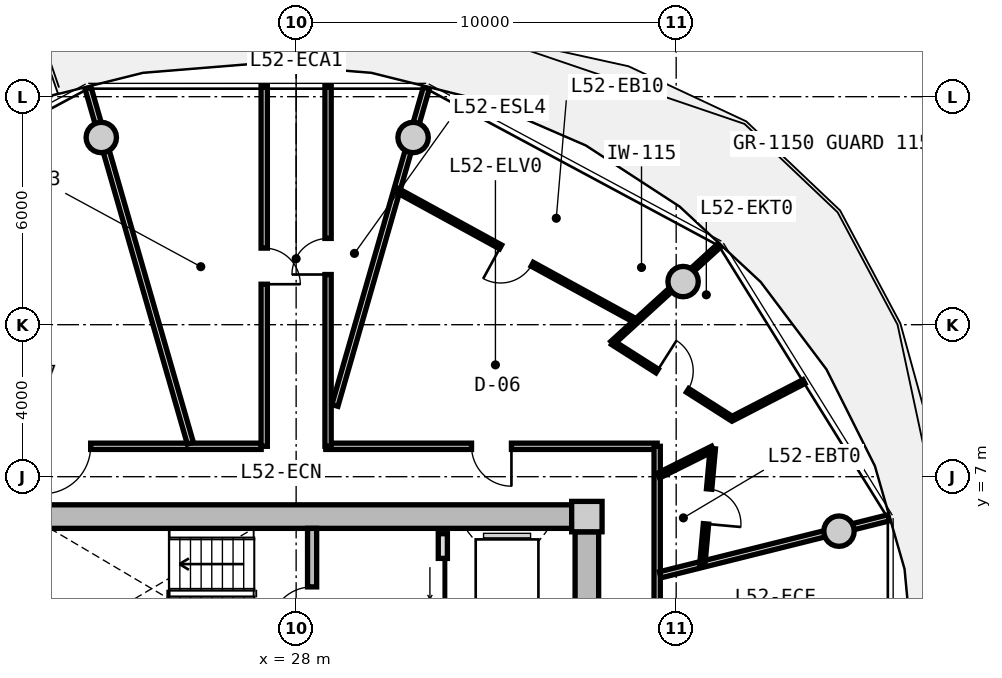
"""IFC4 building model, lengths in metres.
Left out: names, types, materials, properties, quantities, classifications, styles, units other than length and angle.
Written with IfcOpenShell. Run it as: python <this file> out.ifc"""

import sys

from ifc_helpers import new_model, si_unit, direction, frame, frame_2d, origin, origin_2d, place, context, subcontext, project, spatial, rectangle, circle, extrude, source, transform, mapped, element, fill, save


model = new_model("IFC4")
c1 = context("Model", 3, precision=1e-05, world=origin(), true_north=direction((0.0, 1.0)))
c2 = subcontext(c1, "Body", "Model", "MODEL_VIEW")
j1 = project(units=[si_unit("LENGTHUNIT", "METRE"), si_unit("PLANEANGLEUNIT", "RADIAN")], contexts=[c1])
p1 = place(None, origin())
s1 = spatial("IfcSite", under=j1, at=p1, CompositionType="ELEMENT")
p2 = place(p1, origin())
s2 = spatial("IfcBuilding", under=s1, at=p2, CompositionType="ELEMENT")
p3 = place(p2, frame((0.0, 0.0, 167.85)))
s3 = spatial("IfcBuildingStorey", under=s2, at=p3, CompositionType="ELEMENT", Elevation=167.85)
m1 = source(origin(), c2, "Body", "SweptSolid", [
    extrude(rectangle(XDim=0.8, YDim=0.8, at=origin_2d()), origin(), (0.0, 0.0, 1.0), 3.05),
])
p4 = place(p3, frame((35.65, 5.95, 0.0), z_axis=(0.0, 0.0, 1.0), x_axis=(1.0, 0.0, 0.0)))
e1 = element("IfcColumn", 1, at=p4, inside=s3, PredefinedType="COLUMN", context=c2, shape_type="MappedRepresentation", body=[
    mapped(m1, transform((0.0, 0.0, 0.0), x_axis=(1.0, 0.0, 0.0), y_axis=(0.0, 1.0, 0.0), z_axis=(0.0, 0.0, 1.0), scale=1.0)),
])
m2 = source(origin(), c2, "Body", "SweptSolid", [
    extrude(rectangle(XDim=14.5, YDim=0.62, at=frame_2d((7.25, 0.0))), origin(), (0.0, 0.0, 1.0), 2.81),
])
p5 = place(p3, frame((20.75, 5.95, 0.0), z_axis=(0.0, 0.0, 1.0), x_axis=(1.0, 0.0, 0.0)))
e2 = element("IfcWall", 2, at=p5, inside=s3, PredefinedType="SHEAR", context=c2, shape_type="MappedRepresentation", body=[
    mapped(m2, transform((0.0, 0.0, 0.0), x_axis=(1.0, 0.0, 0.0), y_axis=(0.0, 1.0, 0.0), z_axis=(0.0, 0.0, 1.0), scale=1.0)),
])
m3 = source(origin(), c2, "Body", "SweptSolid", [
    extrude(rectangle(XDim=11.1, YDim=0.62, at=frame_2d((5.55, 0.0))), origin(), (0.0, 0.0, 1.0), 2.81),
])
p6 = place(p3, frame((35.65, 5.55, 0.0), z_axis=(0.0, 0.0, 1.0), x_axis=(0.0, -1.0, 0.0)))
e3 = element("IfcWall", 3, at=p6, inside=s3, PredefinedType="SHEAR", context=c2, shape_type="MappedRepresentation", body=[
    mapped(m3, transform((0.0, 0.0, 0.0), x_axis=(1.0, 0.0, 0.0), y_axis=(0.0, 1.0, 0.0), z_axis=(0.0, 0.0, 1.0), scale=1.0)),
])
p7 = place(p6, frame((5.65, 0.0, 0.0)))
e4 = element("IfcOpeningElement", 4, at=p7, cuts=e3, PredefinedType="OPENING", context=c2, shape_type="SweptSolid", body=[
    extrude(rectangle(XDim=1.2, YDim=2.15, at=frame_2d((0.6, 1.075))), frame((0.0, 0.32, 0.0), z_axis=(0.0, -1.0, 0.0), x_axis=(1.0, 0.0, 0.0)), (0.0, 0.0, 1.0), 0.64),
])
p8 = place(p6, frame((9.3, 0.0, 0.0)))
e5 = element("IfcOpeningElement", 5, at=p8, cuts=e3, PredefinedType="OPENING", context=c2, shape_type="SweptSolid", body=[
    extrude(rectangle(XDim=1.0, YDim=2.1, at=frame_2d((0.5, 1.05))), frame((0.0, 0.32, 0.0), z_axis=(0.0, -1.0, 0.0), x_axis=(1.0, 0.0, 0.0)), (0.0, 0.0, 1.0), 0.64),
])
m4 = source(origin(), c2, "Body", "SweptSolid", [
    extrude(circle(Radius=0.4, at=origin_2d()), origin(), (0.0, 0.0, 1.0), 3.05),
])
for number, where, z_axis, x_axis in (
    (6, (42.285, 5.567, 0.0), (0.0, 0.0, 1.0), (1.0, 0.0, 0.0)),
    (7, (38.183, 12.135, 0.0), (0.0, 0.0, 1.0), (1.0, 0.0, 0.0)),
    (8, (31.077, 15.926, 0.0), (0.0, 0.0, 1.0), (1.0, 0.0, 0.0)),
    (9, (22.873, 15.926, 0.0), (0.0, 0.0, 1.0), (1.0, 0.0, 0.0)),
):
    element("IfcColumn", number, at=place(p3, frame(where, z_axis=z_axis, x_axis=x_axis)), inside=s3, PredefinedType="COLUMN", context=c2, shape_type="MappedRepresentation", body=[
        mapped(m4, transform((0.0, 0.0, 0.0), x_axis=(1.0, 0.0, 0.0), y_axis=(0.0, 1.0, 0.0), z_axis=(0.0, 0.0, 1.0), scale=1.0)),
    ])
m5 = source(origin(), c2, "Body", "SweptSolid", [
    extrude(rectangle(XDim=3.19, YDim=0.24, at=frame_2d((1.595, 0.0))), origin(), (0.0, 0.0, 1.0), 2.81),
])
p9 = place(p3, frame((28.42, 2.45, 0.0), z_axis=(0.0, 0.0, 1.0), x_axis=(0.0, 1.0, 0.0)))
e10 = element("IfcWall", 10, at=p9, inside=s3, PredefinedType="PARTITIONING", context=c2, shape_type="MappedRepresentation", body=[
    mapped(m5, transform((0.0, 0.0, 0.0), x_axis=(1.0, 0.0, 0.0), y_axis=(0.0, 1.0, 0.0), z_axis=(0.0, 0.0, 1.0), scale=1.0)),
])
p10 = place(p9, frame((0.55, 0.0, 0.0)))
e11 = element("IfcOpeningElement", 11, at=p10, cuts=e10, PredefinedType="OPENING", context=c2, shape_type="SweptSolid", body=[
    extrude(rectangle(XDim=1.1, YDim=2.15, at=frame_2d((0.55, 1.075))), frame((0.0, 0.13, 0.0), z_axis=(0.0, -1.0, 0.0), x_axis=(1.0, 0.0, 0.0)), (0.0, 0.0, 1.0), 0.26),
])
m6 = source(origin(), c2, "Body", "SweptSolid", [
    extrude(rectangle(XDim=5.0, YDim=0.24, at=frame_2d((2.5, 0.0))), origin(), (0.0, 0.0, 1.0), 2.795),
])
p11 = place(p3, frame((31.86, 0.5, 0.0), z_axis=(0.0, 0.0, 1.0), x_axis=(0.0, 1.0, 0.0)))
e12 = element("IfcWall", 12, at=p11, inside=s3, PredefinedType="PARTITIONING", context=c2, shape_type="MappedRepresentation", body=[
    mapped(m6, transform((0.0, 0.0, 0.0), x_axis=(1.0, 0.0, 0.0), y_axis=(0.0, 1.0, 0.0), z_axis=(0.0, 0.0, 1.0), scale=1.0)),
])
p12 = place(p11, frame((3.05, 0.0, 0.0)))
e13 = element("IfcOpeningElement", 13, at=p12, cuts=e12, PredefinedType="OPENING", context=c2, shape_type="SweptSolid", body=[
    extrude(rectangle(XDim=1.3, YDim=2.2, at=frame_2d((0.65, 1.1))), frame((0.0, 0.13, 0.0), z_axis=(0.0, -1.0, 0.0), x_axis=(1.0, 0.0, 0.0)), (0.0, 0.0, 1.0), 0.26),
])
p13 = place(p11, frame((0.55, 0.0, 0.0)))
e14 = element("IfcOpeningElement", 14, at=p13, cuts=e12, PredefinedType="OPENING", context=c2, shape_type="SweptSolid", body=[
    extrude(rectangle(XDim=1.3, YDim=2.2, at=frame_2d((0.65, 1.1))), frame((0.0, 0.13, 0.0), z_axis=(0.0, -1.0, 0.0), x_axis=(1.0, 0.0, 0.0)), (0.0, 0.0, 1.0), 0.26),
])
m7 = source(origin(), c2, "Body", "SweptSolid", [
    extrude(rectangle(XDim=8.58, YDim=0.165, at=frame_2d((4.29, 0.0))), origin(), (0.0, 0.0, 1.0), 2.795),
])
p14 = place(p3, frame((18.5, 7.8, 0.0), z_axis=(0.0, 0.0, 1.0), x_axis=(1.0, 0.0, 0.0)))
e15 = element("IfcWall", 15, at=p14, inside=s3, PredefinedType="PARTITIONING", context=c2, shape_type="MappedRepresentation", body=[
    mapped(m7, transform((0.0, 0.0, 0.0), x_axis=(1.0, 0.0, 0.0), y_axis=(0.0, 1.0, 0.0), z_axis=(0.0, 0.0, 1.0), scale=1.0)),
])
p15 = place(p14, frame((2.843, 0.0, 0.0)))
e16 = element("IfcOpeningElement", 16, at=p15, cuts=e15, PredefinedType="OPENING", context=c2, shape_type="SweptSolid", body=[
    extrude(rectangle(XDim=1.25, YDim=2.2, at=frame_2d((0.625, 1.1))), frame((0.0, 0.093, 0.0), z_axis=(0.0, -1.0, 0.0), x_axis=(1.0, 0.0, 0.0)), (0.0, 0.0, 1.0), 0.185),
])
m8 = source(origin(), c2, "Body", "SweptSolid", [
    extrude(rectangle(XDim=8.719, YDim=0.165, at=frame_2d((4.36, 0.0))), origin(), (0.0, 0.0, 1.0), 2.795),
])
p16 = place(p3, frame((28.781, 7.8, 0.0), z_axis=(0.0, 0.0, 1.0), x_axis=(1.0, 0.0, 0.0)))
e17 = element("IfcWall", 17, at=p16, inside=s3, PredefinedType="PARTITIONING", context=c2, shape_type="MappedRepresentation", body=[
    mapped(m8, transform((0.0, 0.0, 0.0), x_axis=(1.0, 0.0, 0.0), y_axis=(0.0, 1.0, 0.0), z_axis=(0.0, 0.0, 1.0), scale=1.0)),
])
p17 = place(p16, frame((3.835, 0.0, 0.0)))
e18 = element("IfcOpeningElement", 18, at=p17, cuts=e17, PredefinedType="OPENING", context=c2, shape_type="SweptSolid", body=[
    extrude(rectangle(XDim=1.05, YDim=2.15, at=frame_2d((0.525, 1.075))), frame((0.0, 0.093, 0.0), z_axis=(0.0, -1.0, 0.0), x_axis=(1.0, 0.0, 0.0)), (0.0, 0.0, 1.0), 0.185),
])
m9 = source(origin(), c2, "Body", "SweptSolid", [
    extrude(rectangle(XDim=6.88, YDim=0.165, at=frame_2d((3.44, 0.0))), origin(), (0.0, 0.0, 1.0), 2.795),
])
p18 = place(p3, frame((37.5, 7.8, 0.0), z_axis=(0.0, 0.0, 1.0), x_axis=(0.0, -1.0, 0.0)))
e19 = element("IfcWall", 19, at=p18, inside=s3, PredefinedType="PARTITIONING", context=c2, shape_type="MappedRepresentation", body=[
    mapped(m9, transform((0.0, 0.0, 0.0), x_axis=(1.0, 0.0, 0.0), y_axis=(0.0, 1.0, 0.0), z_axis=(0.0, 0.0, 1.0), scale=1.0)),
])
m10 = source(origin(), c2, "Body", "SweptSolid", [
    extrude(rectangle(XDim=8.695, YDim=0.165, at=frame_2d((4.348, 0.0))), origin(), (0.0, 0.0, 1.0), 2.345),
])
p19 = place(p3, frame((29.02, 8.875, 0.0), z_axis=(0.0, 0.0, 1.0), x_axis=(0.276797231892, 0.960928349263, 0.0)))
e20 = element("IfcWall", 20, at=p19, inside=s3, PredefinedType="PARTITIONING", context=c2, shape_type="MappedRepresentation", body=[
    mapped(m10, transform((0.0, 0.0, 0.0), x_axis=(1.0, 0.0, 0.0), y_axis=(0.0, 1.0, 0.0), z_axis=(0.0, 0.0, 1.0), scale=1.0)),
])
m11 = source(origin(), c2, "Body", "SweptSolid", [
    extrude(rectangle(XDim=9.73, YDim=0.165, at=frame_2d((4.865, 0.0))), origin(), (0.0, 0.0, 1.0), 2.345),
])
p20 = place(p3, frame((25.217, 7.88, 0.0), z_axis=(0.0, 0.0, 1.0), x_axis=(-0.27679492614, 0.960929013436, 0.0)))
e21 = element("IfcWall", 21, at=p20, inside=s3, PredefinedType="PARTITIONING", context=c2, shape_type="MappedRepresentation", body=[
    mapped(m11, transform((0.0, 0.0, 0.0), x_axis=(1.0, 0.0, 0.0), y_axis=(0.0, 1.0, 0.0), z_axis=(0.0, 0.0, 1.0), scale=1.0)),
])
m12 = source(origin(), c2, "Body", "SweptSolid", [
    extrude(rectangle(XDim=6.193, YDim=0.165, at=frame_2d((3.096, 0.0))), origin(), (0.0, 0.0, 1.0), 2.345),
])
p21 = place(p3, frame((37.58, 4.419, 0.0), z_axis=(0.0, 0.0, 1.0), x_axis=(0.970309243466, 0.241867674657, 0.0)))
e22 = element("IfcWall", 22, at=p21, inside=s3, PredefinedType="PARTITIONING", context=c2, shape_type="MappedRepresentation", body=[
    mapped(m12, transform((0.0, 0.0, 0.0), x_axis=(1.0, 0.0, 0.0), y_axis=(0.0, 1.0, 0.0), z_axis=(0.0, 0.0, 1.0), scale=1.0)),
])
m13 = source(origin(), c2, "Body", "SweptSolid", [
    extrude(rectangle(XDim=9.48, YDim=0.165, at=frame_2d((4.74, 0.0))), origin(), (0.0, 0.0, 1.0), 2.795),
])
p22 = place(p3, frame((27.16, 7.8, 0.0), z_axis=(0.0, 0.0, 1.0), x_axis=(0.0, 1.0, 0.0)))
e23 = element("IfcWall", 23, at=p22, inside=s3, PredefinedType="PARTITIONING", context=c2, shape_type="MappedRepresentation", body=[
    mapped(m13, transform((0.0, 0.0, 0.0), x_axis=(1.0, 0.0, 0.0), y_axis=(0.0, 1.0, 0.0), z_axis=(0.0, 0.0, 1.0), scale=1.0)),
])
p23 = place(p22, frame((4.265, 0.0, 0.0)))
e24 = element("IfcOpeningElement", 24, at=p23, cuts=e23, PredefinedType="OPENING", context=c2, shape_type="SweptSolid", body=[
    extrude(rectangle(XDim=0.95, YDim=2.1, at=frame_2d((0.475, 1.05))), frame((0.0, 0.093, 0.0), z_axis=(0.0, -1.0, 0.0), x_axis=(1.0, 0.0, 0.0)), (0.0, 0.0, 1.0), 0.185),
])
p24 = place(p3, frame((28.84, 17.28, 0.0), z_axis=(0.0, 0.0, 1.0), x_axis=(0.0, -1.0, 0.0)))
e25 = element("IfcWall", 25, at=p24, inside=s3, PredefinedType="PARTITIONING", context=c2, shape_type="MappedRepresentation", body=[
    mapped(m13, transform((0.0, 0.0, 0.0), x_axis=(1.0, 0.0, 0.0), y_axis=(0.0, 1.0, 0.0), z_axis=(0.0, 0.0, 1.0), scale=1.0)),
])
p25 = place(p24, frame((4.01, 0.0, 0.0)))
e26 = element("IfcOpeningElement", 26, at=p25, cuts=e25, PredefinedType="OPENING", context=c2, shape_type="SweptSolid", body=[
    extrude(rectangle(XDim=0.95, YDim=2.1, at=frame_2d((0.475, 1.05))), frame((0.0, 0.093, 0.0), z_axis=(0.0, -1.0, 0.0), x_axis=(1.0, 0.0, 0.0)), (0.0, 0.0, 1.0), 0.185),
])
m14 = source(origin(), c2, "Body", "SweptSolid", [
    extrude(rectangle(XDim=7.167, YDim=0.115, at=frame_2d((3.583, 0.0))), origin(), (0.0, 0.0, 1.0), 2.795),
])
p26 = place(p3, frame((36.939, 11.098, 0.0), z_axis=(0.0, 0.0, 1.0), x_axis=(-0.8771628907, 0.480192943699, 0.0)))
e27 = element("IfcWall", 27, at=p26, inside=s3, PredefinedType="PARTITIONING", context=c2, shape_type="MappedRepresentation", body=[
    mapped(m14, transform((0.0, 0.0, 0.0), x_axis=(1.0, 0.0, 0.0), y_axis=(0.0, 1.0, 0.0), z_axis=(0.0, 0.0, 1.0), scale=1.0)),
])
p27 = place(p26, frame((3.108, 0.0, 0.0)))
e28 = element("IfcOpeningElement", 28, at=p27, cuts=e27, PredefinedType="OPENING", context=c2, shape_type="SweptSolid", body=[
    extrude(rectangle(XDim=0.95, YDim=2.1, at=frame_2d((0.475, 1.05))), frame((0.0, 0.067, 0.0), z_axis=(0.0, -1.0, 0.0), x_axis=(1.0, 0.0, 0.0)), (0.0, 0.0, 1.0), 0.135),
])
m15 = source(origin(), c2, "Body", "SweptSolid", [
    extrude(rectangle(XDim=3.814, YDim=0.115, at=frame_2d((1.907, 0.0))), origin(), (0.0, 0.0, 1.0), 2.435),
])
p28 = place(p3, frame((36.319, 10.518, 0.0), z_axis=(0.0, 0.0, 1.0), x_axis=(0.73871962024, 0.674012850524, 0.0)))
e29 = element("IfcWall", 29, at=p28, inside=s3, PredefinedType="PARTITIONING", context=c2, shape_type="MappedRepresentation", body=[
    mapped(m15, transform((0.0, 0.0, 0.0), x_axis=(1.0, 0.0, 0.0), y_axis=(0.0, 1.0, 0.0), z_axis=(0.0, 0.0, 1.0), scale=1.0)),
])
m16 = source(origin(), c2, "Body", "SweptSolid", [
    extrude(rectangle(XDim=1.601, YDim=0.14, at=frame_2d((0.801, 0.0))), origin(), (0.0, 0.0, 1.0), 2.795),
])
p29 = place(p3, frame((37.53, 7.026, 0.0), z_axis=(0.0, 0.0, 1.0), x_axis=(0.895279369592, 0.445505163138, 0.0)))
e30 = element("IfcWall", 30, at=p29, inside=s3, PredefinedType="PARTITIONING", context=c2, shape_type="MappedRepresentation", body=[
    mapped(m16, transform((0.0, 0.0, 0.0), x_axis=(1.0, 0.0, 0.0), y_axis=(0.0, 1.0, 0.0), z_axis=(0.0, 0.0, 1.0), scale=1.0)),
])
m17 = source(origin(), c2, "Body", "SweptSolid", [
    extrude(rectangle(XDim=3.058, YDim=0.14, at=frame_2d((1.529, 0.0))), origin(), (0.0, 0.0, 1.0), 2.795),
])
p30 = place(p3, frame((38.964, 7.74, 0.0), z_axis=(0.0, 0.0, 1.0), x_axis=(-0.090060616512, -0.99593628579, 0.0)))
e31 = element("IfcWall", 31, at=p30, inside=s3, PredefinedType="PARTITIONING", context=c2, shape_type="MappedRepresentation", body=[
    mapped(m17, transform((0.0, 0.0, 0.0), x_axis=(1.0, 0.0, 0.0), y_axis=(0.0, 1.0, 0.0), z_axis=(0.0, 0.0, 1.0), scale=1.0)),
])
p31 = place(p30, frame((1.069, 0.0, 0.0)))
e32 = element("IfcOpeningElement", 32, at=p31, cuts=e31, PredefinedType="OPENING", context=c2, shape_type="SweptSolid", body=[
    extrude(rectangle(XDim=0.92, YDim=2.1, at=frame_2d((0.46, 1.05))), frame((0.0, 0.08, 0.0), z_axis=(0.0, -1.0, 0.0), x_axis=(1.0, 0.0, 0.0)), (0.0, 0.0, 1.0), 0.16),
])
m18 = source(origin(), c2, "Body", "SweptSolid", [
    extrude(rectangle(XDim=2.13, YDim=0.115, at=frame_2d((1.065, 0.0))), origin(), (0.0, 0.0, 1.0), 2.795),
])
p32 = place(p3, frame((39.471, 8.525, 0.0), z_axis=(0.0, 0.0, 1.0), x_axis=(0.888504584778, 0.458867740016, 0.0)))
e33 = element("IfcWall", 33, at=p32, inside=s3, PredefinedType="PARTITIONING", context=c2, shape_type="MappedRepresentation", body=[
    mapped(m18, transform((0.0, 0.0, 0.0), x_axis=(1.0, 0.0, 0.0), y_axis=(0.0, 1.0, 0.0), z_axis=(0.0, 0.0, 1.0), scale=1.0)),
])
m19 = source(origin(), c2, "Body", "SweptSolid", [
    extrude(rectangle(XDim=3.725, YDim=0.115, at=frame_2d((1.863, 0.0))), origin(), (0.0, 0.0, 1.0), 2.795),
])
p33 = place(p3, frame((39.471, 8.525, 0.0), z_axis=(0.0, 0.0, 1.0), x_axis=(-0.843453635564, 0.537201977523, 0.0)))
e34 = element("IfcWall", 34, at=p33, inside=s3, PredefinedType="PARTITIONING", context=c2, shape_type="MappedRepresentation", body=[
    mapped(m19, transform((0.0, 0.0, 0.0), x_axis=(1.0, 0.0, 0.0), y_axis=(0.0, 1.0, 0.0), z_axis=(0.0, 0.0, 1.0), scale=1.0)),
])
p34 = place(p33, frame((1.388, 0.0, 0.0)))
e35 = element("IfcOpeningElement", 35, at=p34, cuts=e34, PredefinedType="OPENING", context=c2, shape_type="SweptSolid", body=[
    extrude(rectangle(XDim=0.95, YDim=2.1, at=frame_2d((0.475, 1.05))), frame((0.0, 0.067, 0.0), z_axis=(0.0, -1.0, 0.0), x_axis=(1.0, 0.0, 0.0)), (0.0, 0.0, 1.0), 0.135),
])
m20 = source(origin(), c2, "Body", "SweptSolid", [
    extrude(rectangle(XDim=1.1, YDim=2.15, at=frame_2d((0.55, 1.075))), frame((0.0, 0.025, 0.0), z_axis=(0.0, -1.0, 0.0), x_axis=(1.0, 0.0, 0.0)), (0.0, 0.0, 1.0), 0.05),
])
p35 = place(p10, origin())
e36 = element("IfcDoor", 36, at=p35, inside=s3, OperationType="SINGLE_SWING_LEFT", PredefinedType="DOOR", context=c2, shape_type="MappedRepresentation", body=[
    mapped(m20, transform((0.0, 0.0, 0.0), x_axis=(1.0, 0.0, 0.0), y_axis=(0.0, 1.0, 0.0), z_axis=(0.0, 0.0, 1.0), scale=1.0)),
])
fill(e11, e36)
m21 = source(origin(), c2, "Body", "SweptSolid", [
    extrude(rectangle(XDim=1.3, YDim=2.2, at=frame_2d((0.65, 1.1))), frame((0.0, 0.025, 0.0), z_axis=(0.0, -1.0, 0.0), x_axis=(1.0, 0.0, 0.0)), (0.0, 0.0, 1.0), 0.05),
])
p36 = place(p12, origin())
e37 = element("IfcDoor", 37, at=p36, inside=s3, OperationType="SLIDING_TO_LEFT", PredefinedType="DOOR", context=c2, shape_type="MappedRepresentation", body=[
    mapped(m21, transform((0.0, 0.0, 0.0), x_axis=(1.0, 0.0, 0.0), y_axis=(0.0, 1.0, 0.0), z_axis=(0.0, 0.0, 1.0), scale=1.0)),
])
fill(e13, e37)
m22 = source(origin(), c2, "Body", "SweptSolid", [
    extrude(rectangle(XDim=0.95, YDim=2.1, at=frame_2d((0.475, 1.05))), frame((0.0, 0.025, 0.0), z_axis=(0.0, -1.0, 0.0), x_axis=(1.0, 0.0, 0.0)), (0.0, 0.0, 1.0), 0.05),
])
p37 = place(p23, frame((0.95, 0.0, 0.0), z_axis=(0.0, 0.0, 1.0), x_axis=(-1.0, 0.0, 0.0)))
e38 = element("IfcDoor", 38, at=p37, inside=s3, OperationType="SINGLE_SWING_RIGHT", PredefinedType="DOOR", context=c2, shape_type="MappedRepresentation", body=[
    mapped(m22, transform((0.0, 0.0, 0.0), x_axis=(1.0, 0.0, 0.0), y_axis=(0.0, 1.0, 0.0), z_axis=(0.0, 0.0, 1.0), scale=1.0)),
])
fill(e24, e38)
p38 = place(p25, frame((0.95, 0.0, 0.0), z_axis=(0.0, 0.0, 1.0), x_axis=(-1.0, 0.0, 0.0)))
e39 = element("IfcDoor", 39, at=p38, inside=s3, OperationType="SINGLE_SWING_LEFT", PredefinedType="DOOR", context=c2, shape_type="MappedRepresentation", body=[
    mapped(m22, transform((0.0, 0.0, 0.0), x_axis=(1.0, 0.0, 0.0), y_axis=(0.0, 1.0, 0.0), z_axis=(0.0, 0.0, 1.0), scale=1.0)),
])
fill(e26, e39)
m23 = source(origin(), c2, "Body", "SweptSolid", [
    extrude(rectangle(XDim=1.05, YDim=2.15, at=frame_2d((0.525, 1.075))), frame((0.0, 0.025, 0.0), z_axis=(0.0, -1.0, 0.0), x_axis=(1.0, 0.0, 0.0)), (0.0, 0.0, 1.0), 0.05),
])
p39 = place(p17, frame((1.05, 0.0, 0.0), z_axis=(0.0, 0.0, 1.0), x_axis=(-1.0, 0.0, 0.0)))
e40 = element("IfcDoor", 40, at=p39, inside=s3, OperationType="SINGLE_SWING_LEFT", PredefinedType="DOOR", context=c2, shape_type="MappedRepresentation", body=[
    mapped(m23, transform((0.0, 0.0, 0.0), x_axis=(1.0, 0.0, 0.0), y_axis=(0.0, 1.0, 0.0), z_axis=(0.0, 0.0, 1.0), scale=1.0)),
])
fill(e18, e40)
m24 = source(origin(), c2, "Body", "SweptSolid", [
    extrude(rectangle(XDim=0.92, YDim=2.1, at=frame_2d((0.46, 1.05))), frame((0.0, 0.025, 0.0), z_axis=(0.0, -1.0, 0.0), x_axis=(1.0, 0.0, 0.0)), (0.0, 0.0, 1.0), 0.05),
])
p40 = place(p31, origin())
e41 = element("IfcDoor", 41, at=p40, inside=s3, OperationType="SINGLE_SWING_RIGHT", PredefinedType="DOOR", context=c2, shape_type="MappedRepresentation", body=[
    mapped(m24, transform((0.0, 0.0, 0.0), x_axis=(1.0, 0.0, 0.0), y_axis=(0.0, 1.0, 0.0), z_axis=(0.0, 0.0, 1.0), scale=1.0)),
])
fill(e32, e41)
p41 = place(p34, frame((0.95, 0.0, 0.0), z_axis=(0.0, 0.0, 1.0), x_axis=(-1.0, 0.0, 0.0)))
e42 = element("IfcDoor", 42, at=p41, inside=s3, OperationType="SINGLE_SWING_LEFT", PredefinedType="DOOR", context=c2, shape_type="MappedRepresentation", body=[
    mapped(m22, transform((0.0, 0.0, 0.0), x_axis=(1.0, 0.0, 0.0), y_axis=(0.0, 1.0, 0.0), z_axis=(0.0, 0.0, 1.0), scale=1.0)),
])
fill(e35, e42)
p42 = place(p27, origin())
e43 = element("IfcDoor", 43, at=p42, inside=s3, OperationType="SINGLE_SWING_RIGHT", PredefinedType="DOOR", context=c2, shape_type="MappedRepresentation", body=[
    mapped(m22, transform((0.0, 0.0, 0.0), x_axis=(1.0, 0.0, 0.0), y_axis=(0.0, 1.0, 0.0), z_axis=(0.0, 0.0, 1.0), scale=1.0)),
])
fill(e28, e43)
m25 = source(origin(), c2, "Body", "SweptSolid", [
    extrude(rectangle(XDim=1.25, YDim=2.2, at=frame_2d((0.625, 1.1))), frame((0.0, 0.025, 0.0), z_axis=(0.0, -1.0, 0.0), x_axis=(1.0, 0.0, 0.0)), (0.0, 0.0, 1.0), 0.05),
])
p43 = place(p15, frame((1.25, 0.0, 0.0), z_axis=(0.0, 0.0, 1.0), x_axis=(-1.0, 0.0, 0.0)))
e44 = element("IfcDoor", 44, at=p43, inside=s3, OperationType="SINGLE_SWING_RIGHT", PredefinedType="DOOR", context=c2, shape_type="MappedRepresentation", body=[
    mapped(m25, transform((0.0, 0.0, 0.0), x_axis=(1.0, 0.0, 0.0), y_axis=(0.0, 1.0, 0.0), z_axis=(0.0, 0.0, 1.0), scale=1.0)),
])
fill(e16, e44)
save(model, sys.argv[1])
